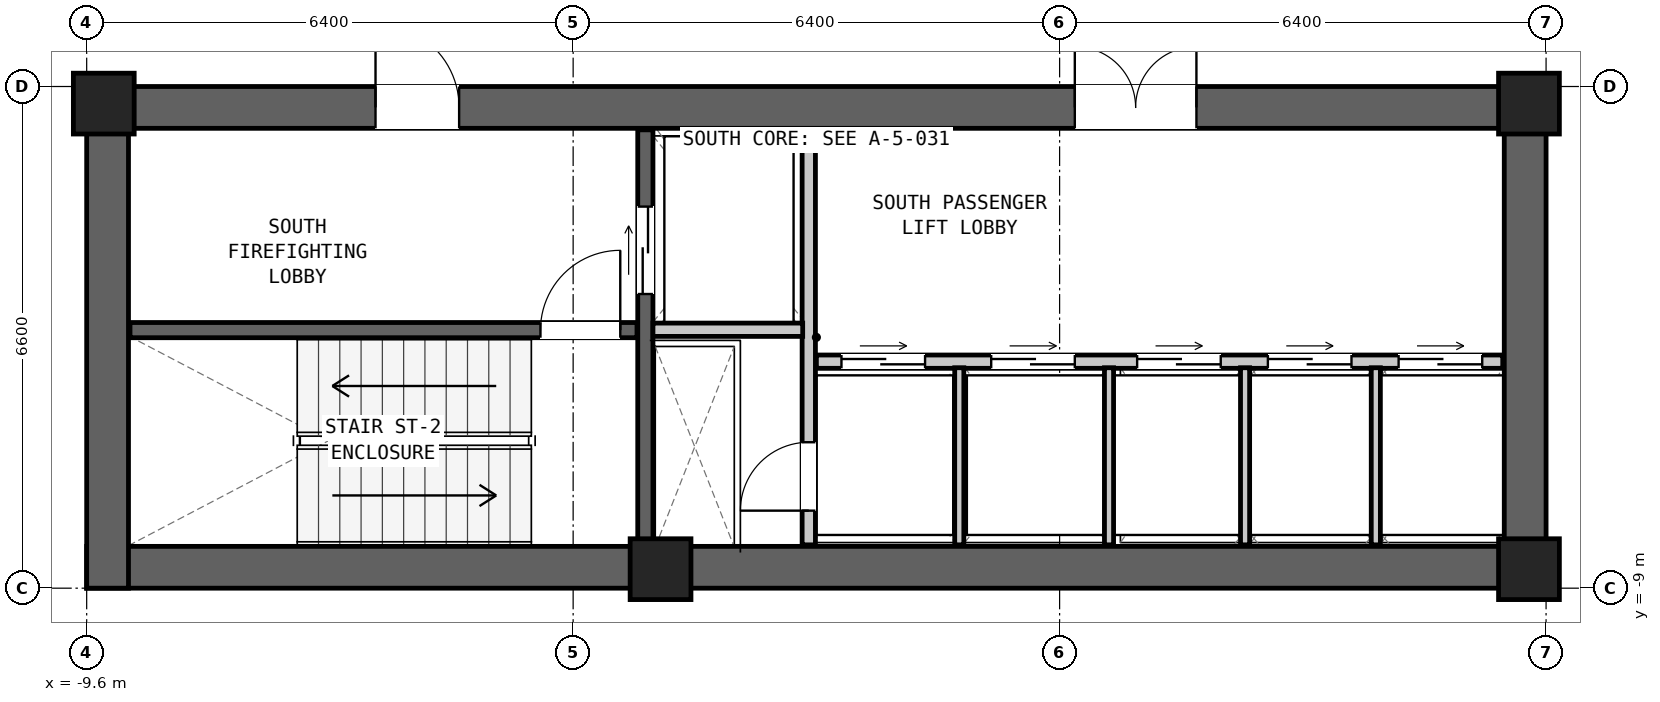
"""IFC4 building model, lengths in metres.
Left out: names, types, materials, properties, quantities, classifications, styles, units other than length and angle.
Written with IfcOpenShell. Run it as: python <this file> out.ifc"""

import sys

from ifc_helpers import new_model, si_unit, direction, frame, frame_2d, origin, origin_2d, place, context, subcontext, project, spatial, rectangle, extrude, element, fill, save


model = new_model("IFC4")
c1 = context("Model", 3, precision=1e-05, world=origin(), true_north=direction((0.0, 1.0)))
c2 = subcontext(c1, "Body", "Model", "MODEL_VIEW")
j1 = project(units=[si_unit("LENGTHUNIT", "METRE"), si_unit("PLANEANGLEUNIT", "RADIAN")], contexts=[c1])
p1 = place(None, origin())
s1 = spatial("IfcSite", under=j1, at=p1, CompositionType="ELEMENT")
p2 = place(p1, origin())
s2 = spatial("IfcBuilding", under=s1, at=p2, CompositionType="ELEMENT")
p3 = place(p2, frame((0.0, 0.0, 96.9)))
s3 = spatial("IfcBuildingStorey", under=s2, at=p3, CompositionType="ELEMENT", Elevation=96.9)
p4 = place(p3, frame((-9.6, -8.725, 0.0), z_axis=(0.0, 0.0, 1.0), x_axis=(1.0, 0.0, 0.0)))
e1 = element("IfcWall", 1, at=p4, inside=s3, PredefinedType="SHEAR", context=c2, shape_type="SweptSolid", body=[
    extrude(rectangle(XDim=19.2, YDim=0.55, at=frame_2d((9.6, 0.0))), origin(), (0.0, 0.0, 1.0), 4.35),
])
p5 = place(p3, frame((-9.6, -2.675, 0.0), z_axis=(0.0, 0.0, 1.0), x_axis=(1.0, 0.0, 0.0)))
e2 = element("IfcWall", 2, at=p5, inside=s3, PredefinedType="SHEAR", context=c2, shape_type="SweptSolid", body=[
    extrude(rectangle(XDim=19.2, YDim=0.55, at=frame_2d((9.6, 0.0))), origin(), (0.0, 0.0, 1.0), 4.35),
])
p6 = place(p5, frame((3.8, 0.0, 0.0)))
e3 = element("IfcOpeningElement", 3, at=p6, cuts=e2, PredefinedType="OPENING", context=c2, shape_type="SweptSolid", body=[
    extrude(rectangle(XDim=1.1, YDim=2.08, at=frame_2d((0.55, 1.04))), frame((0.0, 0.287, 0.0), z_axis=(0.0, -1.0, 0.0), x_axis=(1.0, 0.0, 0.0)), (0.0, 0.0, 1.0), 0.574),
])
p7 = place(p5, frame((13.0, 0.0, 0.0)))
e4 = element("IfcOpeningElement", 4, at=p7, cuts=e2, PredefinedType="OPENING", context=c2, shape_type="SweptSolid", body=[
    extrude(rectangle(XDim=1.6, YDim=2.12, at=frame_2d((0.8, 1.06))), frame((0.0, 0.287, 0.0), z_axis=(0.0, -1.0, 0.0), x_axis=(1.0, 0.0, 0.0)), (0.0, 0.0, 1.0), 0.574),
])
for number, where, z_axis, x_axis in (
    (5, (-9.325, -9.0, 0.0), (0.0, 0.0, 1.0), (0.0, 1.0, 0.0)),
    (6, (9.325, -9.0, 0.0), (0.0, 0.0, 1.0), (0.0, 1.0, 0.0)),
):
    element("IfcWall", number, at=place(p3, frame(where, z_axis=z_axis, x_axis=x_axis)), inside=s3, PredefinedType="SHEAR", context=c2, shape_type="SweptSolid", body=[
        extrude(rectangle(XDim=6.6, YDim=0.55, at=frame_2d((3.3, 0.0))), origin(), (0.0, 0.0, 1.0), 4.35),
    ])
for number, where, z_axis, x_axis in (
    (7, (-9.375, -2.625, 0.0), (0.0, 0.0, 1.0), (1.0, 0.0, 0.0)),
    (8, (9.375, -2.625, 0.0), (0.0, 0.0, 1.0), (1.0, 0.0, 0.0)),
    (9, (-2.05, -8.75, 0.0), (0.0, 0.0, 1.0), (1.0, 0.0, 0.0)),
    (10, (9.375, -8.75, 0.0), (0.0, 0.0, 1.0), (1.0, 0.0, 0.0)),
):
    element("IfcColumn", number, at=place(p3, frame(where, z_axis=z_axis, x_axis=x_axis)), inside=s3, PredefinedType="COLUMN", context=c2, shape_type="SweptSolid", body=[
        extrude(rectangle(XDim=0.8, YDim=0.8, at=origin_2d()), origin(), (0.0, 0.0, 1.0), 4.35),
    ])
p8 = place(p3, frame((-9.03, -5.605, 0.0), z_axis=(0.0, 0.0, 1.0), x_axis=(1.0, 0.0, 0.0)))
e11 = element("IfcWall", 11, at=p8, inside=s3, PredefinedType="SHEAR", context=c2, shape_type="SweptSolid", body=[
    extrude(rectangle(XDim=6.67, YDim=0.2, at=frame_2d((3.335, 0.0))), origin(), (0.0, 0.0, 1.0), 4.07),
])
p9 = place(p8, frame((5.4, 0.0, 0.0)))
e12 = element("IfcOpeningElement", 12, at=p9, cuts=e11, PredefinedType="OPENING", context=c2, shape_type="SweptSolid", body=[
    extrude(rectangle(XDim=1.05, YDim=2.08, at=frame_2d((0.525, 1.04))), frame((0.0, 0.112, 0.0), z_axis=(0.0, -1.0, 0.0), x_axis=(1.0, 0.0, 0.0)), (0.0, 0.0, 1.0), 0.224),
])
p10 = place(p3, frame((-2.25, -8.43, 0.0), z_axis=(0.0, 0.0, 1.0), x_axis=(0.0, 1.0, 0.0)))
e13 = element("IfcWall", 13, at=p10, inside=s3, PredefinedType="SHEAR", context=c2, shape_type="SweptSolid", body=[
    extrude(rectangle(XDim=5.46, YDim=0.2, at=frame_2d((2.73, 0.0))), origin(), (0.0, 0.0, 1.0), 4.07),
])
p11 = place(p10, frame((3.3, 0.0, 0.0)))
e14 = element("IfcOpeningElement", 14, at=p11, cuts=e13, PredefinedType="OPENING", context=c2, shape_type="SweptSolid", body=[
    extrude(rectangle(XDim=1.15, YDim=2.08, at=frame_2d((0.575, 1.04))), frame((0.0, 0.112, 0.0), z_axis=(0.0, -1.0, 0.0), x_axis=(1.0, 0.0, 0.0)), (0.0, 0.0, 1.0), 0.224),
])
p12 = place(p3, frame((-0.1, -8.43, 0.0), z_axis=(0.0, 0.0, 1.0), x_axis=(0.0, 1.0, 0.0)))
e15 = element("IfcWall", 15, at=p12, inside=s3, PredefinedType="PARTITIONING", context=c2, shape_type="SweptSolid", body=[
    extrude(rectangle(XDim=5.46, YDim=0.175, at=frame_2d((2.73, 0.0))), origin(), (0.0, 0.0, 1.0), 4.07),
])
p13 = place(p12, frame((0.45, 0.0, 0.0)))
e16 = element("IfcOpeningElement", 16, at=p13, cuts=e15, PredefinedType="OPENING", context=c2, shape_type="SweptSolid", body=[
    extrude(rectangle(XDim=0.9, YDim=2.05, at=frame_2d((0.45, 1.025))), frame((0.0, 0.1, 0.0), z_axis=(0.0, -1.0, 0.0), x_axis=(1.0, 0.0, 0.0)), (0.0, 0.0, 1.0), 0.199),
])
p14 = place(p3, frame((-2.15, -5.6, 0.0), z_axis=(0.0, 0.0, 1.0), x_axis=(1.0, 0.0, 0.0)))
e17 = element("IfcWall", 17, at=p14, inside=s3, PredefinedType="PARTITIONING", context=c2, shape_type="SweptSolid", body=[
    extrude(rectangle(XDim=1.97, YDim=0.175, at=frame_2d((0.985, 0.0))), origin(), (0.0, 0.0, 1.0), 4.07),
])
p15 = place(p3, frame((0.0, -6.02, 0.0), z_axis=(0.0, 0.0, 1.0), x_axis=(1.0, 0.0, 0.0)))
e18 = element("IfcWall", 18, at=p15, inside=s3, PredefinedType="PARTITIONING", context=c2, shape_type="SweptSolid", body=[
    extrude(rectangle(XDim=9.03, YDim=0.175, at=frame_2d((4.515, 0.0))), origin(), (0.0, 0.0, 1.0), 4.07),
])
p16 = place(p15, frame((0.33, 0.0, 0.0)))
e19 = element("IfcOpeningElement", 19, at=p16, cuts=e18, PredefinedType="OPENING", context=c2, shape_type="SweptSolid", body=[
    extrude(rectangle(XDim=1.1, YDim=2.06, at=frame_2d((0.55, 1.03))), frame((0.0, 0.1, 0.0), z_axis=(0.0, -1.0, 0.0), x_axis=(1.0, 0.0, 0.0)), (0.0, 0.0, 1.0), 0.199),
])
p17 = place(p15, frame((2.3, 0.0, 0.0)))
e20 = element("IfcOpeningElement", 20, at=p17, cuts=e18, PredefinedType="OPENING", context=c2, shape_type="SweptSolid", body=[
    extrude(rectangle(XDim=1.1, YDim=2.06, at=frame_2d((0.55, 1.03))), frame((0.0, 0.1, 0.0), z_axis=(0.0, -1.0, 0.0), x_axis=(1.0, 0.0, 0.0)), (0.0, 0.0, 1.0), 0.199),
])
p18 = place(p15, frame((4.22, 0.0, 0.0)))
e21 = element("IfcOpeningElement", 21, at=p18, cuts=e18, PredefinedType="OPENING", context=c2, shape_type="SweptSolid", body=[
    extrude(rectangle(XDim=1.1, YDim=2.06, at=frame_2d((0.55, 1.03))), frame((0.0, 0.1, 0.0), z_axis=(0.0, -1.0, 0.0), x_axis=(1.0, 0.0, 0.0)), (0.0, 0.0, 1.0), 0.199),
])
p19 = place(p15, frame((5.94, 0.0, 0.0)))
e22 = element("IfcOpeningElement", 22, at=p19, cuts=e18, PredefinedType="OPENING", context=c2, shape_type="SweptSolid", body=[
    extrude(rectangle(XDim=1.1, YDim=2.06, at=frame_2d((0.55, 1.03))), frame((0.0, 0.1, 0.0), z_axis=(0.0, -1.0, 0.0), x_axis=(1.0, 0.0, 0.0)), (0.0, 0.0, 1.0), 0.199),
])
p20 = place(p15, frame((7.66, 0.0, 0.0)))
e23 = element("IfcOpeningElement", 23, at=p20, cuts=e18, PredefinedType="OPENING", context=c2, shape_type="SweptSolid", body=[
    extrude(rectangle(XDim=1.1, YDim=2.06, at=frame_2d((0.55, 1.03))), frame((0.0, 0.1, 0.0), z_axis=(0.0, -1.0, 0.0), x_axis=(1.0, 0.0, 0.0)), (0.0, 0.0, 1.0), 0.199),
])
for number, where, z_axis, x_axis in (
    (24, (1.88, -8.43, 0.0), (0.0, 0.0, 1.0), (0.0, 1.0, 0.0)),
    (25, (3.85, -8.43, 0.0), (0.0, 0.0, 1.0), (0.0, 1.0, 0.0)),
    (26, (5.64, -8.43, 0.0), (0.0, 0.0, 1.0), (0.0, 1.0, 0.0)),
    (27, (7.36, -8.43, 0.0), (0.0, 0.0, 1.0), (0.0, 1.0, 0.0)),
):
    element("IfcWall", number, at=place(p3, frame(where, z_axis=z_axis, x_axis=x_axis)), inside=s3, PredefinedType="PARTITIONING", context=c2, shape_type="SweptSolid", body=[
        extrude(rectangle(XDim=2.33, YDim=0.12, at=frame_2d((1.165, 0.0))), origin(), (0.0, 0.0, 1.0), 4.07),
    ])
p21 = place(p9, origin())
e28 = element("IfcDoor", 28, at=p21, inside=s3, OperationType="SINGLE_SWING_RIGHT", PredefinedType="DOOR", context=c2, shape_type="SweptSolid", body=[
    extrude(rectangle(XDim=1.05, YDim=2.08, at=frame_2d((0.525, 1.04))), frame((0.0, 0.025, 0.0), z_axis=(0.0, -1.0, 0.0), x_axis=(1.0, 0.0, 0.0)), (0.0, 0.0, 1.0), 0.05),
])
fill(e12, e28)
p22 = place(p6, origin())
e29 = element("IfcDoor", 29, at=p22, inside=s3, OperationType="SINGLE_SWING_LEFT", PredefinedType="DOOR", context=c2, shape_type="SweptSolid", body=[
    extrude(rectangle(XDim=1.1, YDim=2.08, at=frame_2d((0.55, 1.04))), frame((0.0, 0.025, 0.0), z_axis=(0.0, -1.0, 0.0), x_axis=(1.0, 0.0, 0.0)), (0.0, 0.0, 1.0), 0.05),
])
fill(e3, e29)
p23 = place(p11, origin())
e30 = element("IfcDoor", 30, at=p23, inside=s3, OperationType="DOUBLE_DOOR_SLIDING", PredefinedType="DOOR", context=c2, shape_type="SweptSolid", body=[
    extrude(rectangle(XDim=1.15, YDim=2.08, at=frame_2d((0.575, 1.04))), frame((0.0, 0.025, 0.0), z_axis=(0.0, -1.0, 0.0), x_axis=(1.0, 0.0, 0.0)), (0.0, 0.0, 1.0), 0.05),
])
fill(e14, e30)
p24 = place(p13, origin())
e31 = element("IfcDoor", 31, at=p24, inside=s3, OperationType="SINGLE_SWING_LEFT", PredefinedType="DOOR", context=c2, shape_type="SweptSolid", body=[
    extrude(rectangle(XDim=0.9, YDim=2.05, at=frame_2d((0.45, 1.025))), frame((0.0, 0.025, 0.0), z_axis=(0.0, -1.0, 0.0), x_axis=(1.0, 0.0, 0.0)), (0.0, 0.0, 1.0), 0.05),
])
fill(e16, e31)
p25 = place(p7, origin())
e32 = element("IfcDoor", 32, at=p25, inside=s3, OperationType="DOUBLE_DOOR_SINGLE_SWING", PredefinedType="DOOR", context=c2, shape_type="SweptSolid", body=[
    extrude(rectangle(XDim=1.6, YDim=2.12, at=frame_2d((0.8, 1.06))), frame((0.0, 0.025, 0.0), z_axis=(0.0, -1.0, 0.0), x_axis=(1.0, 0.0, 0.0)), (0.0, 0.0, 1.0), 0.05),
])
fill(e4, e32)
p26 = place(p16, origin())
e33 = element("IfcDoor", 33, at=p26, inside=s3, OperationType="DOUBLE_DOOR_SLIDING", PredefinedType="DOOR", context=c2, shape_type="SweptSolid", body=[
    extrude(rectangle(XDim=1.1, YDim=2.06, at=frame_2d((0.55, 1.03))), frame((0.0, 0.025, 0.0), z_axis=(0.0, -1.0, 0.0), x_axis=(1.0, 0.0, 0.0)), (0.0, 0.0, 1.0), 0.05),
])
fill(e19, e33)
p27 = place(p17, origin())
e34 = element("IfcDoor", 34, at=p27, inside=s3, OperationType="DOUBLE_DOOR_SLIDING", PredefinedType="DOOR", context=c2, shape_type="SweptSolid", body=[
    extrude(rectangle(XDim=1.1, YDim=2.06, at=frame_2d((0.55, 1.03))), frame((0.0, 0.025, 0.0), z_axis=(0.0, -1.0, 0.0), x_axis=(1.0, 0.0, 0.0)), (0.0, 0.0, 1.0), 0.05),
])
fill(e20, e34)
p28 = place(p18, origin())
e35 = element("IfcDoor", 35, at=p28, inside=s3, OperationType="DOUBLE_DOOR_SLIDING", PredefinedType="DOOR", context=c2, shape_type="SweptSolid", body=[
    extrude(rectangle(XDim=1.1, YDim=2.06, at=frame_2d((0.55, 1.03))), frame((0.0, 0.025, 0.0), z_axis=(0.0, -1.0, 0.0), x_axis=(1.0, 0.0, 0.0)), (0.0, 0.0, 1.0), 0.05),
])
fill(e21, e35)
p29 = place(p19, origin())
e36 = element("IfcDoor", 36, at=p29, inside=s3, OperationType="DOUBLE_DOOR_SLIDING", PredefinedType="DOOR", context=c2, shape_type="SweptSolid", body=[
    extrude(rectangle(XDim=1.1, YDim=2.06, at=frame_2d((0.55, 1.03))), frame((0.0, 0.025, 0.0), z_axis=(0.0, -1.0, 0.0), x_axis=(1.0, 0.0, 0.0)), (0.0, 0.0, 1.0), 0.05),
])
fill(e22, e36)
p30 = place(p20, origin())
e37 = element("IfcDoor", 37, at=p30, inside=s3, OperationType="DOUBLE_DOOR_SLIDING", PredefinedType="DOOR", context=c2, shape_type="SweptSolid", body=[
    extrude(rectangle(XDim=1.1, YDim=2.06, at=frame_2d((0.55, 1.03))), frame((0.0, 0.025, 0.0), z_axis=(0.0, -1.0, 0.0), x_axis=(1.0, 0.0, 0.0)), (0.0, 0.0, 1.0), 0.05),
])
fill(e23, e37)
save(model, sys.argv[1])
